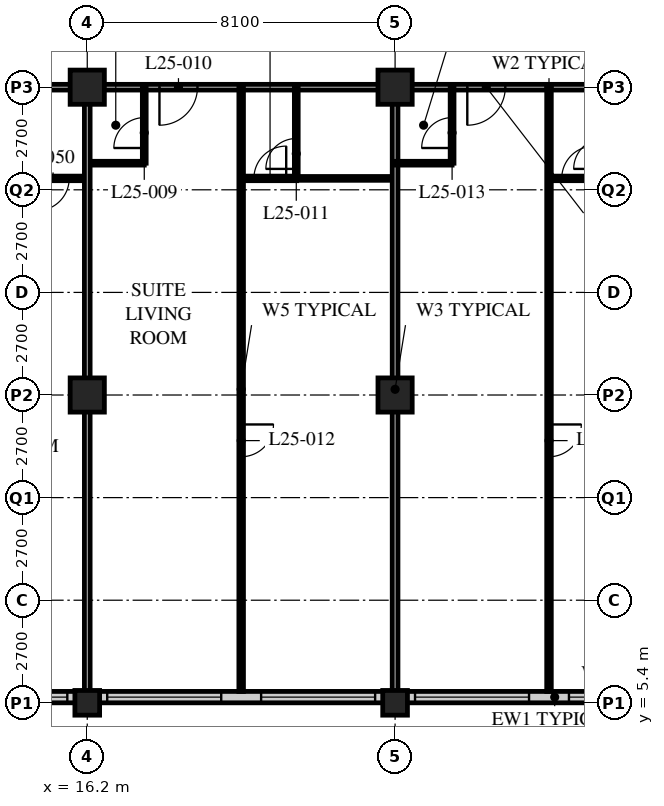
"""IFC4 building model, lengths in metres.
Left out: names, types, materials, properties, quantities, classifications, styles, units other than length and angle.
Written with IfcOpenShell. Run it as: python <this file> out.ifc"""

import sys

from ifc_helpers import new_model, si_unit, direction, frame, frame_2d, origin, origin_2d, place, context, subcontext, project, spatial, rectangle, hollow_rectangle, extrude, element, fill, save


model = new_model("IFC4")
c1 = context("Model", 3, precision=1e-05, world=origin(), true_north=direction((0.0, 1.0)))
c2 = subcontext(c1, "Body", "Model", "MODEL_VIEW")
j1 = project(units=[si_unit("LENGTHUNIT", "METRE"), si_unit("PLANEANGLEUNIT", "RADIAN")], contexts=[c1])
p1 = place(None, origin())
s1 = spatial("IfcSite", under=j1, at=p1, CompositionType="ELEMENT")
p2 = place(p1, origin())
s2 = spatial("IfcBuilding", under=s1, at=p2, CompositionType="ELEMENT")
p3 = place(p2, frame((0.0, 0.0, 103.4)))
s3 = spatial("IfcBuildingStorey", under=s2, at=p3, CompositionType="ELEMENT", Elevation=103.4)
p4 = place(p3, frame((16.2, 5.4, 0.0), z_axis=(0.0, 0.0, 1.0), x_axis=(1.0, 0.0, 0.0)))
e1 = element("IfcColumn", 1, at=p4, inside=s3, PredefinedType="COLUMN", context=c2, shape_type="SweptSolid", body=[
    extrude(hollow_rectangle(XDim=0.65, YDim=0.65, WallThickness=0.055, at=origin_2d()), origin(), (0.0, 0.0, 1.0), 3.4),
])
for number, where, z_axis, x_axis in (
    (2, (16.2, 13.5, 0.0), (0.0, 0.0, 1.0), (1.0, 0.0, 0.0)),
    (3, (16.2, 21.6, 0.0), (0.0, 0.0, 1.0), (1.0, 0.0, 0.0)),
):
    element("IfcColumn", number, at=place(p3, frame(where, z_axis=z_axis, x_axis=x_axis)), inside=s3, PredefinedType="COLUMN", context=c2, shape_type="SweptSolid", body=[
        extrude(hollow_rectangle(XDim=0.9, YDim=0.9, WallThickness=0.1, at=origin_2d()), origin(), (0.0, 0.0, 1.0), 3.4),
    ])
p5 = place(p3, frame((24.3, 5.4, 0.0), z_axis=(0.0, 0.0, 1.0), x_axis=(1.0, 0.0, 0.0)))
e4 = element("IfcColumn", 4, at=p5, inside=s3, PredefinedType="COLUMN", context=c2, shape_type="SweptSolid", body=[
    extrude(hollow_rectangle(XDim=0.65, YDim=0.65, WallThickness=0.055, at=origin_2d()), origin(), (0.0, 0.0, 1.0), 3.4),
])
for number, where, z_axis, x_axis in (
    (5, (24.3, 13.5, 0.0), (0.0, 0.0, 1.0), (1.0, 0.0, 0.0)),
    (6, (24.3, 21.6, 0.0), (0.0, 0.0, 1.0), (1.0, 0.0, 0.0)),
):
    element("IfcColumn", number, at=place(p3, frame(where, z_axis=z_axis, x_axis=x_axis)), inside=s3, PredefinedType="COLUMN", context=c2, shape_type="SweptSolid", body=[
        extrude(hollow_rectangle(XDim=0.9, YDim=0.9, WallThickness=0.1, at=origin_2d()), origin(), (0.0, 0.0, 1.0), 3.4),
    ])
p6 = place(p3, frame((8.4, 5.55, 0.0), z_axis=(0.0, 0.0, 1.0), x_axis=(1.0, 0.0, 0.0)))
e7 = element("IfcWall", 7, at=p6, inside=s3, PredefinedType="SOLIDWALL", context=c2, shape_type="SweptSolid", body=[
    extrude(rectangle(XDim=40.2, YDim=0.3, at=frame_2d((20.1, 0.0))), origin(), (0.0, 0.0, 1.0), 3.19),
])
p7 = place(p6, frame((0.225, 0.0, 0.9)))
e8 = element("IfcOpeningElement", 8, at=p7, cuts=e7, PredefinedType="OPENING", context=c2, shape_type="SweptSolid", body=[
    extrude(rectangle(XDim=3.0, YDim=2.0, at=frame_2d((1.5, 1.0))), frame((0.0, 0.16, 0.0), z_axis=(0.0, -1.0, 0.0), x_axis=(1.0, 0.0, 0.0)), (0.0, 0.0, 1.0), 0.32),
])
p8 = place(p6, frame((4.275, 0.0, 0.9)))
e9 = element("IfcOpeningElement", 9, at=p8, cuts=e7, PredefinedType="OPENING", context=c2, shape_type="SweptSolid", body=[
    extrude(rectangle(XDim=3.0, YDim=2.0, at=frame_2d((1.5, 1.0))), frame((0.0, 0.16, 0.0), z_axis=(0.0, -1.0, 0.0), x_axis=(1.0, 0.0, 0.0)), (0.0, 0.0, 1.0), 0.32),
])
p9 = place(p6, frame((8.325, 0.0, 0.9)))
e10 = element("IfcOpeningElement", 10, at=p9, cuts=e7, PredefinedType="OPENING", context=c2, shape_type="SweptSolid", body=[
    extrude(rectangle(XDim=3.0, YDim=2.0, at=frame_2d((1.5, 1.0))), frame((0.0, 0.16, 0.0), z_axis=(0.0, -1.0, 0.0), x_axis=(1.0, 0.0, 0.0)), (0.0, 0.0, 1.0), 0.32),
])
p10 = place(p6, frame((12.375, 0.0, 0.9)))
e11 = element("IfcOpeningElement", 11, at=p10, cuts=e7, PredefinedType="OPENING", context=c2, shape_type="SweptSolid", body=[
    extrude(rectangle(XDim=3.0, YDim=2.0, at=frame_2d((1.5, 1.0))), frame((0.0, 0.16, 0.0), z_axis=(0.0, -1.0, 0.0), x_axis=(1.0, 0.0, 0.0)), (0.0, 0.0, 1.0), 0.32),
])
p11 = place(p6, frame((16.425, 0.0, 0.9)))
e12 = element("IfcOpeningElement", 12, at=p11, cuts=e7, PredefinedType="OPENING", context=c2, shape_type="SweptSolid", body=[
    extrude(rectangle(XDim=3.0, YDim=2.0, at=frame_2d((1.5, 1.0))), frame((0.0, 0.16, 0.0), z_axis=(0.0, -1.0, 0.0), x_axis=(1.0, 0.0, 0.0)), (0.0, 0.0, 1.0), 0.32),
])
p12 = place(p6, frame((20.475, 0.0, 0.9)))
e13 = element("IfcOpeningElement", 13, at=p12, cuts=e7, PredefinedType="OPENING", context=c2, shape_type="SweptSolid", body=[
    extrude(rectangle(XDim=3.0, YDim=2.0, at=frame_2d((1.5, 1.0))), frame((0.0, 0.16, 0.0), z_axis=(0.0, -1.0, 0.0), x_axis=(1.0, 0.0, 0.0)), (0.0, 0.0, 1.0), 0.32),
])
p13 = place(p6, frame((24.525, 0.0, 0.9)))
e14 = element("IfcOpeningElement", 14, at=p13, cuts=e7, PredefinedType="OPENING", context=c2, shape_type="SweptSolid", body=[
    extrude(rectangle(XDim=3.0, YDim=2.0, at=frame_2d((1.5, 1.0))), frame((0.0, 0.16, 0.0), z_axis=(0.0, -1.0, 0.0), x_axis=(1.0, 0.0, 0.0)), (0.0, 0.0, 1.0), 0.32),
])
p14 = place(p6, frame((28.575, 0.0, 0.9)))
e15 = element("IfcOpeningElement", 15, at=p14, cuts=e7, PredefinedType="OPENING", context=c2, shape_type="SweptSolid", body=[
    extrude(rectangle(XDim=3.0, YDim=2.0, at=frame_2d((1.5, 1.0))), frame((0.0, 0.16, 0.0), z_axis=(0.0, -1.0, 0.0), x_axis=(1.0, 0.0, 0.0)), (0.0, 0.0, 1.0), 0.32),
])
p15 = place(p6, frame((32.625, 0.0, 0.9)))
e16 = element("IfcOpeningElement", 16, at=p15, cuts=e7, PredefinedType="OPENING", context=c2, shape_type="SweptSolid", body=[
    extrude(rectangle(XDim=3.0, YDim=2.0, at=frame_2d((1.5, 1.0))), frame((0.0, 0.16, 0.0), z_axis=(0.0, -1.0, 0.0), x_axis=(1.0, 0.0, 0.0)), (0.0, 0.0, 1.0), 0.32),
])
p16 = place(p6, frame((36.675, 0.0, 0.9)))
e17 = element("IfcOpeningElement", 17, at=p16, cuts=e7, PredefinedType="OPENING", context=c2, shape_type="SweptSolid", body=[
    extrude(rectangle(XDim=3.0, YDim=2.0, at=frame_2d((1.5, 1.0))), frame((0.0, 0.16, 0.0), z_axis=(0.0, -1.0, 0.0), x_axis=(1.0, 0.0, 0.0)), (0.0, 0.0, 1.0), 0.32),
])
p17 = place(p3, frame((12.15, 21.6, 0.0), z_axis=(0.0, 0.0, 1.0), x_axis=(1.0, 0.0, 0.0)))
e18 = element("IfcWall", 18, at=p17, inside=s3, PredefinedType="PARTITIONING", context=c2, shape_type="SweptSolid", body=[
    extrude(rectangle(XDim=32.4, YDim=0.15, at=frame_2d((16.2, 0.0))), origin(), (0.0, 0.0, 1.0), 2.578),
])
p18 = place(p17, frame((5.95, 0.0, 0.0)))
e19 = element("IfcOpeningElement", 19, at=p18, cuts=e18, PredefinedType="OPENING", context=c2, shape_type="SweptSolid", body=[
    extrude(rectangle(XDim=1.0, YDim=2.1, at=frame_2d((0.5, 1.05))), frame((0.0, 0.085, 0.0), z_axis=(0.0, -1.0, 0.0), x_axis=(1.0, 0.0, 0.0)), (0.0, 0.0, 1.0), 0.17),
])
p19 = place(p17, frame((14.05, 0.0, 0.0)))
e20 = element("IfcOpeningElement", 20, at=p19, cuts=e18, PredefinedType="OPENING", context=c2, shape_type="SweptSolid", body=[
    extrude(rectangle(XDim=1.0, YDim=2.1, at=frame_2d((0.5, 1.05))), frame((0.0, 0.085, 0.0), z_axis=(0.0, -1.0, 0.0), x_axis=(1.0, 0.0, 0.0)), (0.0, 0.0, 1.0), 0.17),
])
p20 = place(p17, frame((22.15, 0.0, 0.0)))
e21 = element("IfcOpeningElement", 21, at=p20, cuts=e18, PredefinedType="OPENING", context=c2, shape_type="SweptSolid", body=[
    extrude(rectangle(XDim=1.0, YDim=2.1, at=frame_2d((0.5, 1.05))), frame((0.0, 0.085, 0.0), z_axis=(0.0, -1.0, 0.0), x_axis=(1.0, 0.0, 0.0)), (0.0, 0.0, 1.0), 0.17),
])
p21 = place(p17, frame((1.525, 0.0, 0.0)))
e22 = element("IfcOpeningElement", 22, at=p21, cuts=e18, PredefinedType="OPENING", context=c2, shape_type="SweptSolid", body=[
    extrude(rectangle(XDim=1.0, YDim=2.1, at=frame_2d((0.5, 1.05))), frame((0.0, 0.085, 0.0), z_axis=(0.0, -1.0, 0.0), x_axis=(1.0, 0.0, 0.0)), (0.0, 0.0, 1.0), 0.17),
])
p22 = place(p17, frame((29.875, 0.0, 0.0)))
e23 = element("IfcOpeningElement", 23, at=p22, cuts=e18, PredefinedType="OPENING", context=c2, shape_type="SweptSolid", body=[
    extrude(rectangle(XDim=1.0, YDim=2.1, at=frame_2d((0.5, 1.05))), frame((0.0, 0.085, 0.0), z_axis=(0.0, -1.0, 0.0), x_axis=(1.0, 0.0, 0.0)), (0.0, 0.0, 1.0), 0.17),
])
p23 = place(p3, frame((16.2, 19.6, 0.0), z_axis=(0.0, 0.0, 1.0), x_axis=(1.0, 0.0, 0.0)))
e24 = element("IfcWall", 24, at=p23, inside=s3, PredefinedType="PARTITIONING", context=c2, shape_type="SweptSolid", body=[
    extrude(rectangle(XDim=1.5, YDim=0.1, at=frame_2d((0.75, 0.0))), origin(), (0.0, 0.0, 1.0), 3.19),
])
p24 = place(p3, frame((17.7, 21.6, 0.0), z_axis=(0.0, 0.0, 1.0), x_axis=(0.0, -1.0, 0.0)))
e25 = element("IfcWall", 25, at=p24, inside=s3, PredefinedType="PARTITIONING", context=c2, shape_type="SweptSolid", body=[
    extrude(rectangle(XDim=2.0, YDim=0.1, at=frame_2d((1.0, 0.0))), origin(), (0.0, 0.0, 1.0), 3.19),
])
p25 = place(p24, frame((0.8, 0.0, 0.0)))
e26 = element("IfcOpeningElement", 26, at=p25, cuts=e25, PredefinedType="OPENING", context=c2, shape_type="SweptSolid", body=[
    extrude(rectangle(XDim=0.8, YDim=2.1, at=frame_2d((0.4, 1.05))), frame((0.0, 0.06, 0.0), z_axis=(0.0, -1.0, 0.0), x_axis=(1.0, 0.0, 0.0)), (0.0, 0.0, 1.0), 0.12),
])
p26 = place(p3, frame((21.7, 19.2, 0.0), z_axis=(0.0, 0.0, 1.0), x_axis=(1.0, 0.0, 0.0)))
e27 = element("IfcWall", 27, at=p26, inside=s3, PredefinedType="PARTITIONING", context=c2, shape_type="SweptSolid", body=[
    extrude(rectangle(XDim=2.6, YDim=0.1, at=frame_2d((1.3, 0.0))), origin(), (0.0, 0.0, 1.0), 3.19),
])
p27 = place(p3, frame((21.7, 21.6, 0.0), z_axis=(0.0, 0.0, 1.0), x_axis=(0.0, -1.0, 0.0)))
e28 = element("IfcWall", 28, at=p27, inside=s3, PredefinedType="PARTITIONING", context=c2, shape_type="SweptSolid", body=[
    extrude(rectangle(XDim=2.4, YDim=0.1, at=frame_2d((1.2, 0.0))), origin(), (0.0, 0.0, 1.0), 3.19),
])
p28 = place(p27, frame((1.35, 0.0, 0.0)))
e29 = element("IfcOpeningElement", 29, at=p28, cuts=e28, PredefinedType="OPENING", context=c2, shape_type="SweptSolid", body=[
    extrude(rectangle(XDim=0.8, YDim=2.1, at=frame_2d((0.4, 1.05))), frame((0.0, 0.06, 0.0), z_axis=(0.0, -1.0, 0.0), x_axis=(1.0, 0.0, 0.0)), (0.0, 0.0, 1.0), 0.12),
])
p29 = place(p3, frame((20.25, 21.6, 0.0), z_axis=(0.0, 0.0, 1.0), x_axis=(0.0, -1.0, 0.0)))
e30 = element("IfcWall", 30, at=p29, inside=s3, PredefinedType="PARTITIONING", context=c2, shape_type="SweptSolid", body=[
    extrude(rectangle(XDim=15.9, YDim=0.12, at=frame_2d((7.95, 0.0))), origin(), (0.0, 0.0, 1.0), 3.19),
])
p30 = place(p29, frame((8.875, 0.0, 0.0)))
e31 = element("IfcOpeningElement", 31, at=p30, cuts=e30, PredefinedType="OPENING", context=c2, shape_type="SweptSolid", body=[
    extrude(rectangle(XDim=0.85, YDim=2.1, at=frame_2d((0.425, 1.05))), frame((0.0, 0.07, 0.0), z_axis=(0.0, -1.0, 0.0), x_axis=(1.0, 0.0, 0.0)), (0.0, 0.0, 1.0), 0.14),
])
p31 = place(p3, frame((24.3, 21.6, 0.0), z_axis=(0.0, 0.0, 1.0), x_axis=(0.0, -1.0, 0.0)))
e32 = element("IfcWall", 32, at=p31, inside=s3, PredefinedType="PARTITIONING", context=c2, shape_type="SweptSolid", body=[
    extrude(rectangle(XDim=15.9, YDim=0.15, at=frame_2d((7.95, 0.0))), origin(), (0.0, 0.0, 1.0), 2.578),
])
p32 = place(p3, frame((24.3, 19.6, 0.0), z_axis=(0.0, 0.0, 1.0), x_axis=(1.0, 0.0, 0.0)))
e33 = element("IfcWall", 33, at=p32, inside=s3, PredefinedType="PARTITIONING", context=c2, shape_type="SweptSolid", body=[
    extrude(rectangle(XDim=1.5, YDim=0.1, at=frame_2d((0.75, 0.0))), origin(), (0.0, 0.0, 1.0), 3.19),
])
p33 = place(p3, frame((25.8, 21.6, 0.0), z_axis=(0.0, 0.0, 1.0), x_axis=(0.0, -1.0, 0.0)))
e34 = element("IfcWall", 34, at=p33, inside=s3, PredefinedType="PARTITIONING", context=c2, shape_type="SweptSolid", body=[
    extrude(rectangle(XDim=2.0, YDim=0.1, at=frame_2d((1.0, 0.0))), origin(), (0.0, 0.0, 1.0), 3.19),
])
p34 = place(p33, frame((0.8, 0.0, 0.0)))
e35 = element("IfcOpeningElement", 35, at=p34, cuts=e34, PredefinedType="OPENING", context=c2, shape_type="SweptSolid", body=[
    extrude(rectangle(XDim=0.8, YDim=2.1, at=frame_2d((0.4, 1.05))), frame((0.0, 0.06, 0.0), z_axis=(0.0, -1.0, 0.0), x_axis=(1.0, 0.0, 0.0)), (0.0, 0.0, 1.0), 0.12),
])
p35 = place(p3, frame((28.35, 21.6, 0.0), z_axis=(0.0, 0.0, 1.0), x_axis=(0.0, -1.0, 0.0)))
e36 = element("IfcWall", 36, at=p35, inside=s3, PredefinedType="PARTITIONING", context=c2, shape_type="SweptSolid", body=[
    extrude(rectangle(XDim=15.9, YDim=0.12, at=frame_2d((7.95, 0.0))), origin(), (0.0, 0.0, 1.0), 3.19),
])
p36 = place(p35, frame((8.875, 0.0, 0.0)))
e37 = element("IfcOpeningElement", 37, at=p36, cuts=e36, PredefinedType="OPENING", context=c2, shape_type="SweptSolid", body=[
    extrude(rectangle(XDim=0.85, YDim=2.1, at=frame_2d((0.425, 1.05))), frame((0.0, 0.07, 0.0), z_axis=(0.0, -1.0, 0.0), x_axis=(1.0, 0.0, 0.0)), (0.0, 0.0, 1.0), 0.14),
])
p37 = place(p3, frame((8.15, 19.2, 0.0), z_axis=(0.0, 0.0, 1.0), x_axis=(1.0, 0.0, 0.0)))
e38 = element("IfcWall", 38, at=p37, inside=s3, PredefinedType="PARTITIONING", context=c2, shape_type="SweptSolid", body=[
    extrude(rectangle(XDim=8.05, YDim=0.12, at=frame_2d((4.025, 0.0))), origin(), (0.0, 0.0, 1.0), 3.19),
])
p38 = place(p37, frame((6.725, 0.0, 0.0)))
e39 = element("IfcOpeningElement", 39, at=p38, cuts=e38, PredefinedType="OPENING", context=c2, shape_type="SweptSolid", body=[
    extrude(rectangle(XDim=0.85, YDim=2.1, at=frame_2d((0.425, 1.05))), frame((0.0, 0.07, 0.0), z_axis=(0.0, -1.0, 0.0), x_axis=(1.0, 0.0, 0.0)), (0.0, 0.0, 1.0), 0.14),
])
p39 = place(p37, frame((2.875, 0.0, 0.0)))
e40 = element("IfcOpeningElement", 40, at=p39, cuts=e38, PredefinedType="OPENING", context=c2, shape_type="SweptSolid", body=[
    extrude(rectangle(XDim=0.85, YDim=2.1, at=frame_2d((0.425, 1.05))), frame((0.0, 0.07, 0.0), z_axis=(0.0, -1.0, 0.0), x_axis=(1.0, 0.0, 0.0)), (0.0, 0.0, 1.0), 0.14),
])
p40 = place(p3, frame((16.2, 21.6, 0.0), z_axis=(0.0, 0.0, 1.0), x_axis=(0.0, -1.0, 0.0)))
e41 = element("IfcWall", 41, at=p40, inside=s3, PredefinedType="PARTITIONING", context=c2, shape_type="SweptSolid", body=[
    extrude(rectangle(XDim=15.9, YDim=0.15, at=frame_2d((7.95, 0.0))), origin(), (0.0, 0.0, 1.0), 2.578),
])
p41 = place(p3, frame((21.71, 19.2, 0.0), z_axis=(0.0, 0.0, 1.0), x_axis=(-1.0, 0.0, 0.0)))
e42 = element("IfcWall", 42, at=p41, inside=s3, PredefinedType="PARTITIONING", context=c2, shape_type="SweptSolid", body=[
    extrude(rectangle(XDim=1.46, YDim=0.12, at=frame_2d((0.73, 0.0))), origin(), (0.0, 0.0, 1.0), 3.19),
])
p42 = place(p41, frame((0.275, 0.0, 0.0)))
e43 = element("IfcOpeningElement", 43, at=p42, cuts=e42, PredefinedType="OPENING", context=c2, shape_type="SweptSolid", body=[
    extrude(rectangle(XDim=0.85, YDim=2.1, at=frame_2d((0.425, 1.05))), frame((0.0, 0.07, 0.0), z_axis=(0.0, -1.0, 0.0), x_axis=(1.0, 0.0, 0.0)), (0.0, 0.0, 1.0), 0.14),
])
p43 = place(p3, frame((29.81, 19.2, 0.0), z_axis=(0.0, 0.0, 1.0), x_axis=(-1.0, 0.0, 0.0)))
e44 = element("IfcWall", 44, at=p43, inside=s3, PredefinedType="PARTITIONING", context=c2, shape_type="SweptSolid", body=[
    extrude(rectangle(XDim=1.46, YDim=0.12, at=frame_2d((0.73, 0.0))), origin(), (0.0, 0.0, 1.0), 3.19),
])
p44 = place(p43, frame((0.275, 0.0, 0.0)))
e45 = element("IfcOpeningElement", 45, at=p44, cuts=e44, PredefinedType="OPENING", context=c2, shape_type="SweptSolid", body=[
    extrude(rectangle(XDim=0.85, YDim=2.1, at=frame_2d((0.425, 1.05))), frame((0.0, 0.07, 0.0), z_axis=(0.0, -1.0, 0.0), x_axis=(1.0, 0.0, 0.0)), (0.0, 0.0, 1.0), 0.14),
])
p45 = place(p8, origin())
e46 = element("IfcWindow", 46, at=p45, inside=s3, PartitioningType="SINGLE_PANEL", PredefinedType="WINDOW", context=c2, shape_type="SweptSolid", body=[
    extrude(rectangle(XDim=3.0, YDim=2.0, at=frame_2d((1.5, 1.0))), frame((0.0, 0.03, 0.0), z_axis=(0.0, -1.0, 0.0), x_axis=(1.0, 0.0, 0.0)), (0.0, 0.0, 1.0), 0.06),
])
fill(e9, e46)
p46 = place(p9, origin())
e47 = element("IfcWindow", 47, at=p46, inside=s3, PartitioningType="SINGLE_PANEL", PredefinedType="WINDOW", context=c2, shape_type="SweptSolid", body=[
    extrude(rectangle(XDim=3.0, YDim=2.0, at=frame_2d((1.5, 1.0))), frame((0.0, 0.03, 0.0), z_axis=(0.0, -1.0, 0.0), x_axis=(1.0, 0.0, 0.0)), (0.0, 0.0, 1.0), 0.06),
])
fill(e10, e47)
p47 = place(p10, origin())
e48 = element("IfcWindow", 48, at=p47, inside=s3, PartitioningType="SINGLE_PANEL", PredefinedType="WINDOW", context=c2, shape_type="SweptSolid", body=[
    extrude(rectangle(XDim=3.0, YDim=2.0, at=frame_2d((1.5, 1.0))), frame((0.0, 0.03, 0.0), z_axis=(0.0, -1.0, 0.0), x_axis=(1.0, 0.0, 0.0)), (0.0, 0.0, 1.0), 0.06),
])
fill(e11, e48)
p48 = place(p11, origin())
e49 = element("IfcWindow", 49, at=p48, inside=s3, PartitioningType="SINGLE_PANEL", PredefinedType="WINDOW", context=c2, shape_type="SweptSolid", body=[
    extrude(rectangle(XDim=3.0, YDim=2.0, at=frame_2d((1.5, 1.0))), frame((0.0, 0.03, 0.0), z_axis=(0.0, -1.0, 0.0), x_axis=(1.0, 0.0, 0.0)), (0.0, 0.0, 1.0), 0.06),
])
fill(e12, e49)
p49 = place(p12, origin())
e50 = element("IfcWindow", 50, at=p49, inside=s3, PartitioningType="SINGLE_PANEL", PredefinedType="WINDOW", context=c2, shape_type="SweptSolid", body=[
    extrude(rectangle(XDim=3.0, YDim=2.0, at=frame_2d((1.5, 1.0))), frame((0.0, 0.03, 0.0), z_axis=(0.0, -1.0, 0.0), x_axis=(1.0, 0.0, 0.0)), (0.0, 0.0, 1.0), 0.06),
])
fill(e13, e50)
p50 = place(p25, origin())
e51 = element("IfcDoor", 51, at=p50, inside=s3, OperationType="SINGLE_SWING_LEFT", PredefinedType="DOOR", context=c2, shape_type="SweptSolid", body=[
    extrude(rectangle(XDim=0.8, YDim=2.1, at=frame_2d((0.4, 1.05))), frame((0.0, 0.025, 0.0), z_axis=(0.0, -1.0, 0.0), x_axis=(1.0, 0.0, 0.0)), (0.0, 0.0, 1.0), 0.05),
])
fill(e26, e51)
p51 = place(p18, origin())
e52 = element("IfcDoor", 52, at=p51, inside=s3, OperationType="SINGLE_SWING_RIGHT", PredefinedType="DOOR", context=c2, shape_type="SweptSolid", body=[
    extrude(rectangle(XDim=1.0, YDim=2.1, at=frame_2d((0.5, 1.05))), frame((0.0, 0.025, 0.0), z_axis=(0.0, -1.0, 0.0), x_axis=(1.0, 0.0, 0.0)), (0.0, 0.0, 1.0), 0.05),
])
fill(e19, e52)
p52 = place(p28, origin())
e53 = element("IfcDoor", 53, at=p52, inside=s3, OperationType="SINGLE_SWING_LEFT", PredefinedType="DOOR", context=c2, shape_type="SweptSolid", body=[
    extrude(rectangle(XDim=0.8, YDim=2.1, at=frame_2d((0.4, 1.05))), frame((0.0, 0.025, 0.0), z_axis=(0.0, -1.0, 0.0), x_axis=(1.0, 0.0, 0.0)), (0.0, 0.0, 1.0), 0.05),
])
fill(e29, e53)
p53 = place(p30, origin())
e54 = element("IfcDoor", 54, at=p53, inside=s3, OperationType="SINGLE_SWING_LEFT", PredefinedType="DOOR", context=c2, shape_type="SweptSolid", body=[
    extrude(rectangle(XDim=0.85, YDim=2.1, at=frame_2d((0.425, 1.05))), frame((0.0, 0.025, 0.0), z_axis=(0.0, -1.0, 0.0), x_axis=(1.0, 0.0, 0.0)), (0.0, 0.0, 1.0), 0.05),
])
fill(e31, e54)
p54 = place(p34, origin())
e55 = element("IfcDoor", 55, at=p54, inside=s3, OperationType="SINGLE_SWING_LEFT", PredefinedType="DOOR", context=c2, shape_type="SweptSolid", body=[
    extrude(rectangle(XDim=0.8, YDim=2.1, at=frame_2d((0.4, 1.05))), frame((0.0, 0.025, 0.0), z_axis=(0.0, -1.0, 0.0), x_axis=(1.0, 0.0, 0.0)), (0.0, 0.0, 1.0), 0.05),
])
fill(e35, e55)
p55 = place(p19, origin())
e56 = element("IfcDoor", 56, at=p55, inside=s3, OperationType="SINGLE_SWING_RIGHT", PredefinedType="DOOR", context=c2, shape_type="SweptSolid", body=[
    extrude(rectangle(XDim=1.0, YDim=2.1, at=frame_2d((0.5, 1.05))), frame((0.0, 0.025, 0.0), z_axis=(0.0, -1.0, 0.0), x_axis=(1.0, 0.0, 0.0)), (0.0, 0.0, 1.0), 0.05),
])
fill(e20, e56)
p56 = place(p36, origin())
e57 = element("IfcDoor", 57, at=p56, inside=s3, OperationType="SINGLE_SWING_LEFT", PredefinedType="DOOR", context=c2, shape_type="SweptSolid", body=[
    extrude(rectangle(XDim=0.85, YDim=2.1, at=frame_2d((0.425, 1.05))), frame((0.0, 0.025, 0.0), z_axis=(0.0, -1.0, 0.0), x_axis=(1.0, 0.0, 0.0)), (0.0, 0.0, 1.0), 0.05),
])
fill(e37, e57)
p57 = place(p38, origin())
e58 = element("IfcDoor", 58, at=p57, inside=s3, OperationType="SINGLE_SWING_RIGHT", PredefinedType="DOOR", context=c2, shape_type="SweptSolid", body=[
    extrude(rectangle(XDim=0.85, YDim=2.1, at=frame_2d((0.425, 1.05))), frame((0.0, 0.025, 0.0), z_axis=(0.0, -1.0, 0.0), x_axis=(1.0, 0.0, 0.0)), (0.0, 0.0, 1.0), 0.05),
])
fill(e39, e58)
p58 = place(p42, origin())
e59 = element("IfcDoor", 59, at=p58, inside=s3, OperationType="SINGLE_SWING_RIGHT", PredefinedType="DOOR", context=c2, shape_type="SweptSolid", body=[
    extrude(rectangle(XDim=0.85, YDim=2.1, at=frame_2d((0.425, 1.05))), frame((0.0, 0.025, 0.0), z_axis=(0.0, -1.0, 0.0), x_axis=(1.0, 0.0, 0.0)), (0.0, 0.0, 1.0), 0.05),
])
fill(e43, e59)
p59 = place(p44, origin())
e60 = element("IfcDoor", 60, at=p59, inside=s3, OperationType="SINGLE_SWING_RIGHT", PredefinedType="DOOR", context=c2, shape_type="SweptSolid", body=[
    extrude(rectangle(XDim=0.85, YDim=2.1, at=frame_2d((0.425, 1.05))), frame((0.0, 0.025, 0.0), z_axis=(0.0, -1.0, 0.0), x_axis=(1.0, 0.0, 0.0)), (0.0, 0.0, 1.0), 0.05),
])
fill(e45, e60)
save(model, sys.argv[1])
